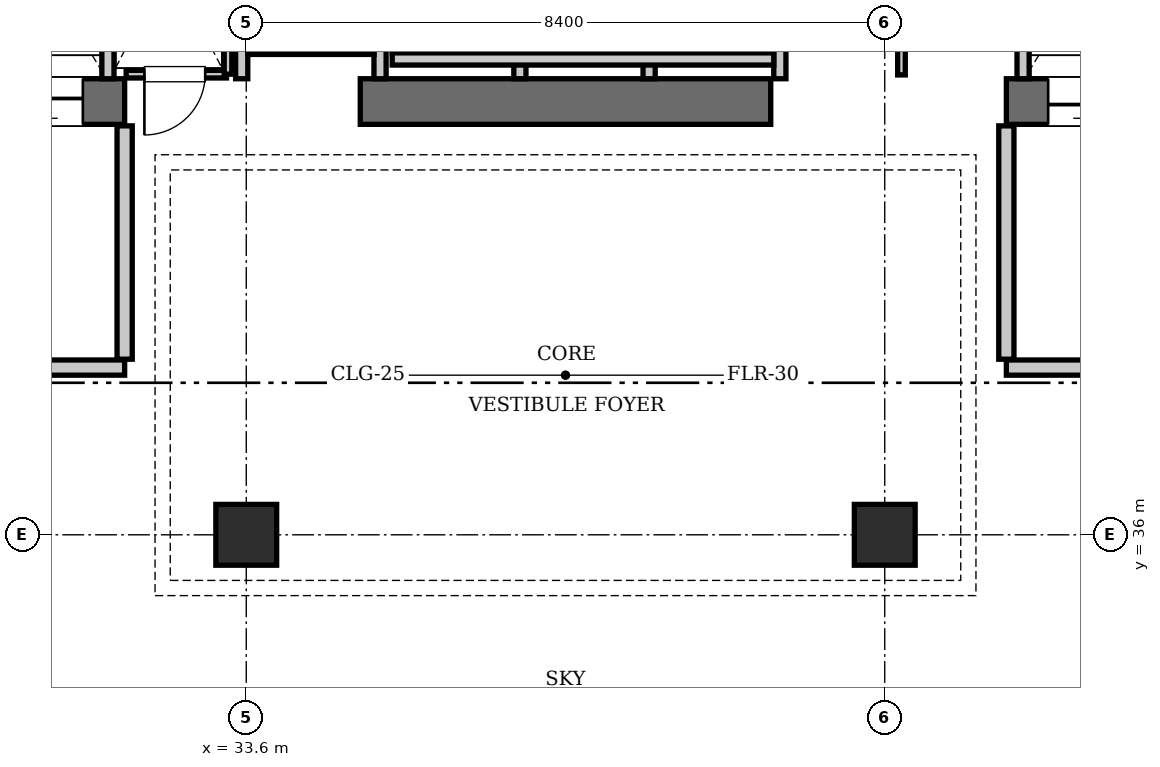
"""IFC4 building model, lengths in metres.
Left out: names, types, materials, properties, quantities, classifications, styles, units other than length and angle.
Written with IfcOpenShell. Run it as: python <this file> out.ifc"""

import sys

from ifc_helpers import new_model, si_unit, direction, frame, frame_2d, origin, origin_2d, place, context, subcontext, project, spatial, rectangle, extrude, element, fill, save


model = new_model("IFC4")
c1 = context("Model", 3, precision=1e-05, world=origin(), true_north=direction((0.0, 1.0)))
c2 = subcontext(c1, "Body", "Model", "MODEL_VIEW")
j1 = project(units=[si_unit("LENGTHUNIT", "METRE"), si_unit("PLANEANGLEUNIT", "RADIAN")], contexts=[c1])
p1 = place(None, origin())
s1 = spatial("IfcSite", under=j1, at=p1, CompositionType="ELEMENT")
p2 = place(p1, origin())
s2 = spatial("IfcBuilding", under=s1, at=p2, CompositionType="ELEMENT")
p3 = place(p2, frame((0.0, 0.0, 322.0)))
s3 = spatial("IfcBuildingStorey", under=s2, at=p3, CompositionType="ELEMENT", Elevation=322.0)
p4 = place(p3, frame((25.2, 41.7, 0.0), z_axis=(0.0, 0.0, 1.0), x_axis=(1.0, 0.0, 0.0)))
e1 = element("IfcWall", 1, at=p4, inside=s3, PredefinedType="SHEAR", context=c2, shape_type="SweptSolid", body=[
    extrude(rectangle(XDim=6.8, YDim=0.6, at=frame_2d((3.4, 0.0))), origin(), (0.0, 0.0, 1.0), 3.85),
])
p5 = place(p4, frame((1.65, 0.0, 0.0)))
e2 = element("IfcOpeningElement", 2, at=p5, cuts=e1, PredefinedType="OPENING", context=c2, shape_type="SweptSolid", body=[
    extrude(rectangle(XDim=1.15, YDim=2.15, at=frame_2d((0.575, 1.075))), frame((0.0, 0.31, 0.0), z_axis=(0.0, -1.0, 0.0), x_axis=(1.0, 0.0, 0.0)), (0.0, 0.0, 1.0), 0.62),
])
p6 = place(p4, frame((5.15, 0.0, 0.0)))
e3 = element("IfcOpeningElement", 3, at=p6, cuts=e1, PredefinedType="OPENING", context=c2, shape_type="SweptSolid", body=[
    extrude(rectangle(XDim=1.1, YDim=2.2, at=frame_2d((0.55, 1.1))), frame((0.0, 0.31, 0.0), z_axis=(0.0, -1.0, 0.0), x_axis=(1.0, 0.0, 0.0)), (0.0, 0.0, 1.0), 0.62),
])
p7 = place(p3, frame((35.1, 41.7, 0.0), z_axis=(0.0, 0.0, 1.0), x_axis=(1.0, 0.0, 0.0)))
e4 = element("IfcWall", 4, at=p7, inside=s3, PredefinedType="SHEAR", context=c2, shape_type="SweptSolid", body=[
    extrude(rectangle(XDim=5.4, YDim=0.6, at=frame_2d((2.7, 0.0))), origin(), (0.0, 0.0, 1.0), 3.85),
])
p8 = place(p3, frame((43.6, 41.7, 0.0), z_axis=(0.0, 0.0, 1.0), x_axis=(1.0, 0.0, 0.0)))
e5 = element("IfcWall", 5, at=p8, inside=s3, PredefinedType="SHEAR", context=c2, shape_type="SweptSolid", body=[
    extrude(rectangle(XDim=6.8, YDim=0.6, at=frame_2d((3.4, 0.0))), origin(), (0.0, 0.0, 1.0), 3.85),
])
p9 = place(p8, frame((3.9, 0.0, 0.0)))
e6 = element("IfcOpeningElement", 6, at=p9, cuts=e5, PredefinedType="OPENING", context=c2, shape_type="SweptSolid", body=[
    extrude(rectangle(XDim=1.15, YDim=2.15, at=frame_2d((0.575, 1.075))), frame((0.0, 0.31, 0.0), z_axis=(0.0, -1.0, 0.0), x_axis=(1.0, 0.0, 0.0)), (0.0, 0.0, 1.0), 0.62),
])
p10 = place(p8, frame((0.55, 0.0, 0.0)))
e7 = element("IfcOpeningElement", 7, at=p10, cuts=e5, PredefinedType="OPENING", context=c2, shape_type="SweptSolid", body=[
    extrude(rectangle(XDim=1.1, YDim=2.2, at=frame_2d((0.55, 1.1))), frame((0.0, 0.31, 0.0), z_axis=(0.0, -1.0, 0.0), x_axis=(1.0, 0.0, 0.0)), (0.0, 0.0, 1.0), 0.62),
])
for number, where, z_axis, x_axis in (
    (8, (33.6, 36.0, 0.0), (0.0, 0.0, 1.0), (1.0, 0.0, 0.0)),
    (9, (42.0, 36.0, 0.0), (0.0, 0.0, 1.0), (1.0, 0.0, 0.0)),
):
    element("IfcColumn", number, at=place(p3, frame(where, z_axis=z_axis, x_axis=x_axis)), inside=s3, PredefinedType="COLUMN", context=c2, shape_type="SweptSolid", body=[
        extrude(rectangle(XDim=0.8, YDim=0.8, at=origin_2d()), origin(), (0.0, 0.0, 1.0), 3.85),
    ])
for number, where, z_axis, x_axis in (
    (10, (31.78, 42.0, 0.0), (0.0, 0.0, 1.0), (0.0, 1.0, 0.0)),
    (11, (43.82, 42.0, 0.0), (0.0, 0.0, 1.0), (0.0, 1.0, 0.0)),
):
    element("IfcWall", number, at=place(p3, frame(where, z_axis=z_axis, x_axis=x_axis)), inside=s3, PredefinedType="SOLIDWALL", context=c2, shape_type="SweptSolid", body=[
        extrude(rectangle(XDim=2.74, YDim=0.16, at=frame_2d((1.37, 0.0))), origin(), (0.0, 0.0, 1.0), 3.61),
    ])
for number, where, z_axis, x_axis in (
    (12, (37.2, 42.0, 0.0), (0.0, 0.0, 1.0), (0.0, 1.0, 0.0)),
    (13, (38.9, 42.0, 0.0), (0.0, 0.0, 1.0), (0.0, 1.0, 0.0)),
    (14, (40.62, 42.0, 0.0), (0.0, 0.0, 1.0), (0.0, 1.0, 0.0)),
):
    element("IfcWall", number, at=place(p3, frame(where, z_axis=z_axis, x_axis=x_axis)), inside=s3, PredefinedType="SOLIDWALL", context=c2, shape_type="SweptSolid", body=[
        extrude(rectangle(XDim=2.35, YDim=0.16, at=frame_2d((1.175, 0.0))), origin(), (0.0, 0.0, 1.0), 3.61),
    ])
p11 = place(p3, frame((35.52, 42.26, 0.0), z_axis=(0.0, 0.0, 1.0), x_axis=(1.0, 0.0, 0.0)))
e15 = element("IfcWall", 15, at=p11, inside=s3, PredefinedType="SOLIDWALL", context=c2, shape_type="SweptSolid", body=[
    extrude(rectangle(XDim=5.02, YDim=0.16, at=frame_2d((2.51, 0.0))), origin(), (0.0, 0.0, 1.0), 3.61),
])
for number, where, z_axis, x_axis in (
    (16, (33.54, 42.0, 0.0), (0.0, 0.0, 1.0), (0.0, 1.0, 0.0)),
    (17, (35.36, 42.0, 0.0), (0.0, 0.0, 1.0), (0.0, 1.0, 0.0)),
):
    element("IfcWall", number, at=place(p3, frame(where, z_axis=z_axis, x_axis=x_axis)), inside=s3, PredefinedType="SOLIDWALL", context=c2, shape_type="SweptSolid", body=[
        extrude(rectangle(XDim=2.4, YDim=0.16, at=frame_2d((1.2, 0.0))), origin(), (0.0, 0.0, 1.0), 3.61),
    ])
p12 = place(p3, frame((33.62, 42.4, 0.0), z_axis=(0.0, 0.0, 1.0), x_axis=(1.0, 0.0, 0.0)))
e18 = element("IfcWall", 18, at=p12, inside=s3, PredefinedType="SOLIDWALL", context=c2, shape_type="SweptSolid", body=[
    extrude(rectangle(XDim=1.66, YDim=0.16, at=frame_2d((0.83, 0.0))), origin(), (0.0, 0.0, 1.0), 3.61),
])
p13 = place(p3, frame((26.2, 38.2, 0.0), z_axis=(0.0, 0.0, 1.0), x_axis=(1.0, 0.0, 0.0)))
e19 = element("IfcWall", 19, at=p13, inside=s3, PredefinedType="PARTITIONING", context=c2, shape_type="SweptSolid", body=[
    extrude(rectangle(XDim=5.8, YDim=0.2, at=frame_2d((2.9, 0.0))), origin(), (0.0, 0.0, 1.0), 3.61),
])
p14 = place(p13, frame((2.3, 0.0, 0.0)))
e20 = element("IfcOpeningElement", 20, at=p14, cuts=e19, PredefinedType="OPENING", context=c2, shape_type="SweptSolid", body=[
    extrude(rectangle(XDim=1.15, YDim=2.15, at=frame_2d((0.575, 1.075))), frame((0.0, 0.11, 0.0), z_axis=(0.0, -1.0, 0.0), x_axis=(1.0, 0.0, 0.0)), (0.0, 0.0, 1.0), 0.22),
])
p15 = place(p3, frame((32.0, 38.31, 0.0), z_axis=(0.0, 0.0, 1.0), x_axis=(0.0, 1.0, 0.0)))
e21 = element("IfcWall", 21, at=p15, inside=s3, PredefinedType="PARTITIONING", context=c2, shape_type="SweptSolid", body=[
    extrude(rectangle(XDim=3.07, YDim=0.2, at=frame_2d((1.535, 0.0))), origin(), (0.0, 0.0, 1.0), 3.61),
])
p16 = place(p3, frame((43.6, 38.2, 0.0), z_axis=(0.0, 0.0, 1.0), x_axis=(1.0, 0.0, 0.0)))
e22 = element("IfcWall", 22, at=p16, inside=s3, PredefinedType="PARTITIONING", context=c2, shape_type="SweptSolid", body=[
    extrude(rectangle(XDim=5.8, YDim=0.2, at=frame_2d((2.9, 0.0))), origin(), (0.0, 0.0, 1.0), 3.61),
])
p17 = place(p16, frame((2.3, 0.0, 0.0)))
e23 = element("IfcOpeningElement", 23, at=p17, cuts=e22, PredefinedType="OPENING", context=c2, shape_type="SweptSolid", body=[
    extrude(rectangle(XDim=1.15, YDim=2.15, at=frame_2d((0.575, 1.075))), frame((0.0, 0.11, 0.0), z_axis=(0.0, -1.0, 0.0), x_axis=(1.0, 0.0, 0.0)), (0.0, 0.0, 1.0), 0.22),
])
p18 = place(p3, frame((43.6, 38.31, 0.0), z_axis=(0.0, 0.0, 1.0), x_axis=(0.0, 1.0, 0.0)))
e24 = element("IfcWall", 24, at=p18, inside=s3, PredefinedType="PARTITIONING", context=c2, shape_type="SweptSolid", body=[
    extrude(rectangle(XDim=3.07, YDim=0.2, at=frame_2d((1.535, 0.0))), origin(), (0.0, 0.0, 1.0), 3.61),
])
p19 = place(p3, frame((32.02, 42.06, 0.0), z_axis=(0.0, 0.0, 1.0), x_axis=(1.0, 0.0, 0.0)))
e25 = element("IfcWall", 25, at=p19, inside=s3, PredefinedType="PARTITIONING", context=c2, shape_type="SweptSolid", body=[
    extrude(rectangle(XDim=1.32, YDim=0.1, at=frame_2d((0.66, 0.0))), origin(), (0.0, 0.0, 1.0), 3.61),
])
p20 = place(p19, frame((0.24, 0.0, 0.0)))
e26 = element("IfcOpeningElement", 26, at=p20, cuts=e25, PredefinedType="OPENING", context=c2, shape_type="SweptSolid", body=[
    extrude(rectangle(XDim=0.8, YDim=2.05, at=frame_2d((0.4, 1.025))), frame((0.0, 0.06, 0.0), z_axis=(0.0, -1.0, 0.0), x_axis=(1.0, 0.0, 0.0)), (0.0, 0.0, 1.0), 0.12),
])
p21 = place(p3, frame((33.36, 42.06, 0.0), z_axis=(0.0, 0.0, 1.0), x_axis=(0.0, 1.0, 0.0)))
e27 = element("IfcWall", 27, at=p21, inside=s3, PredefinedType="PARTITIONING", context=c2, shape_type="SweptSolid", body=[
    extrude(rectangle(XDim=2.88, YDim=0.1, at=frame_2d((1.44, 0.0))), origin(), (0.0, 0.0, 1.0), 3.61),
])
p22 = place(p3, frame((42.22, 42.05, 0.0), z_axis=(0.0, 0.0, 1.0), x_axis=(0.0, 1.0, 0.0)))
e28 = element("IfcWall", 28, at=p22, inside=s3, PredefinedType="PARTITIONING", context=c2, shape_type="SweptSolid", body=[
    extrude(rectangle(XDim=2.91, YDim=0.1, at=frame_2d((1.455, 0.0))), origin(), (0.0, 0.0, 1.0), 3.61),
])
p23 = place(p22, frame((0.65, 0.0, 0.0)))
e29 = element("IfcOpeningElement", 29, at=p23, cuts=e28, PredefinedType="OPENING", context=c2, shape_type="SweptSolid", body=[
    extrude(rectangle(XDim=0.8, YDim=2.05, at=frame_2d((0.4, 1.025))), frame((0.0, 0.06, 0.0), z_axis=(0.0, -1.0, 0.0), x_axis=(1.0, 0.0, 0.0)), (0.0, 0.0, 1.0), 0.12),
])
p24 = place(p6, frame((1.1, 0.0, 0.0), z_axis=(0.0, 0.0, 1.0), x_axis=(-1.0, 0.0, 0.0)))
e30 = element("IfcDoor", 30, at=p24, inside=s3, OperationType="SLIDING_TO_LEFT", PredefinedType="DOOR", context=c2, shape_type="SweptSolid", body=[
    extrude(rectangle(XDim=1.1, YDim=2.2, at=frame_2d((0.55, 1.1))), frame((0.0, 0.025, 0.0), z_axis=(0.0, -1.0, 0.0), x_axis=(1.0, 0.0, 0.0)), (0.0, 0.0, 1.0), 0.05),
])
fill(e3, e30)
p25 = place(p10, frame((1.1, 0.0, 0.0), z_axis=(0.0, 0.0, 1.0), x_axis=(-1.0, 0.0, 0.0)))
e31 = element("IfcDoor", 31, at=p25, inside=s3, OperationType="SLIDING_TO_LEFT", PredefinedType="DOOR", context=c2, shape_type="SweptSolid", body=[
    extrude(rectangle(XDim=1.1, YDim=2.2, at=frame_2d((0.55, 1.1))), frame((0.0, 0.025, 0.0), z_axis=(0.0, -1.0, 0.0), x_axis=(1.0, 0.0, 0.0)), (0.0, 0.0, 1.0), 0.05),
])
fill(e7, e31)
p26 = place(p20, frame((0.8, 0.0, 0.0), z_axis=(0.0, 0.0, 1.0), x_axis=(-1.0, 0.0, 0.0)))
e32 = element("IfcDoor", 32, at=p26, inside=s3, OperationType="SINGLE_SWING_RIGHT", PredefinedType="DOOR", context=c2, shape_type="SweptSolid", body=[
    extrude(rectangle(XDim=0.8, YDim=2.05, at=frame_2d((0.4, 1.025))), frame((0.0, 0.025, 0.0), z_axis=(0.0, -1.0, 0.0), x_axis=(1.0, 0.0, 0.0)), (0.0, 0.0, 1.0), 0.05),
])
fill(e26, e32)
save(model, sys.argv[1])
